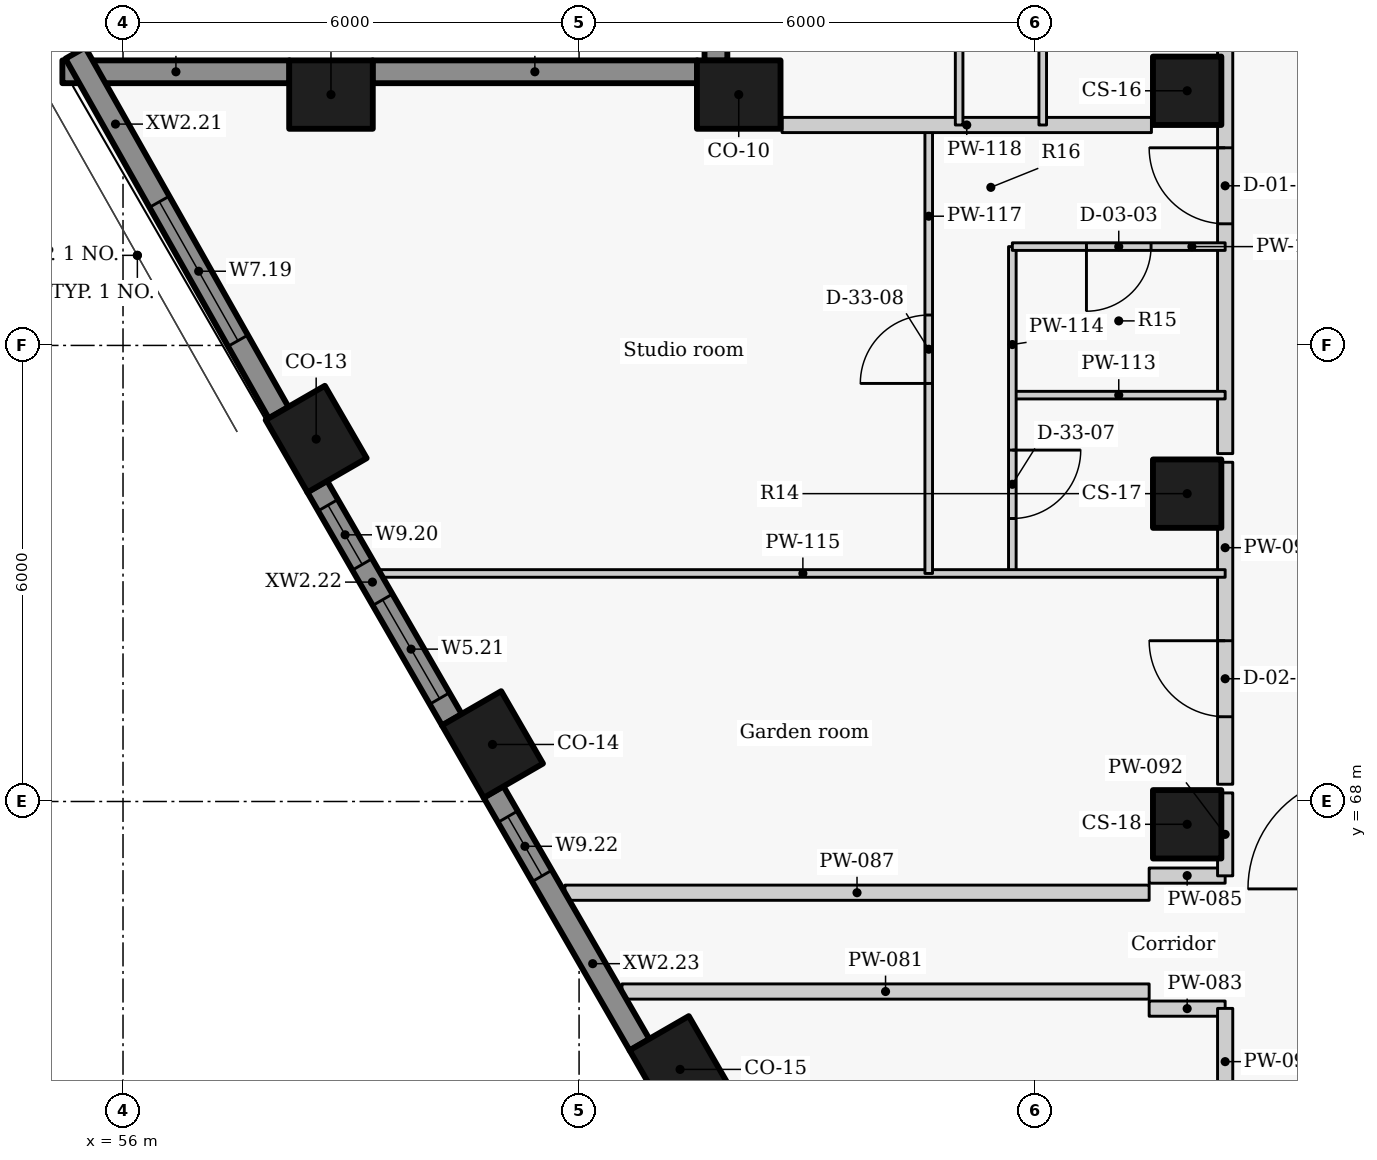
"""IFC4 building model, lengths in metres.
Left out: names, types, materials, properties, quantities, classifications, styles, units other than length and angle.
Written with IfcOpenShell. Run it as: python <this file> out.ifc"""

import sys

from ifc_helpers import new_model, si_unit, direction, frame, frame_2d, origin, origin_2d, place, context, subcontext, project, spatial, rectangle, extrude, element, fill, save


model = new_model("IFC4")
c1 = context("Model", 3, precision=1e-05, world=origin(), true_north=direction((0.0, 1.0)))
c2 = subcontext(c1, "Body", "Model", "MODEL_VIEW")
j1 = project(units=[si_unit("LENGTHUNIT", "METRE"), si_unit("PLANEANGLEUNIT", "RADIAN")], contexts=[c1])
p1 = place(None, origin())
s1 = spatial("IfcSite", under=j1, at=p1, CompositionType="ELEMENT")
p2 = place(p1, origin())
s2 = spatial("IfcBuilding", under=s1, at=p2, CompositionType="ELEMENT")
p3 = place(p2, frame((0.0, 0.0, 239.4)))
s3 = spatial("IfcBuildingStorey", under=s2, at=p3, CompositionType="ELEMENT", Elevation=239.4)
for number, where, z_axis, x_axis in (
    (1, (64.101, 77.3, 0.0), (0.0, 0.0, 1.0), (-1.0, 0.0, 0.0)),
    (2, (58.736, 77.3, 0.0), (0.0, 0.0, 1.0), (-1.0, 0.0, 0.0)),
    (3, (58.541, 72.768, 0.0), (0.0, 0.0, 1.0), (0.5, -0.866, 0.0)),
    (4, (60.861, 68.75, 0.0), (0.0, 0.0, 1.0), (0.5, -0.866, 0.0)),
    (5, (63.329, 64.475, 0.0), (0.0, 0.0, 1.0), (0.5, -0.866, 0.0)),
):
    element("IfcColumn", number, at=place(p3, frame(where, z_axis=z_axis, x_axis=x_axis)), inside=s3, PredefinedType="COLUMN", context=c2, shape_type="SweptSolid", body=[
        extrude(rectangle(XDim=1.1, YDim=0.9, at=origin_2d()), origin(), (0.0, 0.0, 1.0), 3.3),
    ])
for number, where, z_axis, x_axis in (
    (6, (70.0, 77.35, 0.0), (0.0, 0.0, 1.0), (0.0, -1.0, 0.0)),
    (7, (70.0, 72.05, 0.0), (0.0, 0.0, 1.0), (0.0, -1.0, 0.0)),
    (8, (70.0, 67.7, 0.0), (0.0, 0.0, 1.0), (0.0, -1.0, 0.0)),
):
    element("IfcColumn", number, at=place(p3, frame(where, z_axis=z_axis, x_axis=x_axis)), inside=s3, PredefinedType="COLUMN", context=c2, shape_type="SweptSolid", body=[
        extrude(rectangle(XDim=0.9, YDim=0.9, at=origin_2d()), origin(), (0.0, 0.0, 1.0), 3.3),
    ])
p4 = place(p3, frame((63.801, 82.154, 0.0), z_axis=(0.0, 0.0, 1.0), x_axis=(0.0, -1.0, 0.0)))
e9 = element("IfcWall", 9, at=p4, inside=s3, PredefinedType="SOLIDWALL", context=c2, shape_type="SweptSolid", body=[
    extrude(rectangle(XDim=4.408, YDim=0.3, at=frame_2d((2.204, 0.0))), origin(), (0.0, 0.0, 1.0), 2.425),
])
p5 = place(p4, frame((0.352, 0.0, 0.9)))
e10 = element("IfcOpeningElement", 10, at=p5, cuts=e9, PredefinedType="OPENING", context=c2, shape_type="SweptSolid", body=[
    extrude(rectangle(XDim=0.6, YDim=1.1, at=frame_2d((0.3, 0.55))), frame((0.0, 0.16, 0.0), z_axis=(0.0, -1.0, 0.0), x_axis=(1.0, 0.0, 0.0)), (0.0, 0.0, 1.0), 0.32),
])
p6 = place(p4, frame((1.769, 0.0, 0.9)))
e11 = element("IfcOpeningElement", 11, at=p6, cuts=e9, PredefinedType="OPENING", context=c2, shape_type="SweptSolid", body=[
    extrude(rectangle(XDim=2.1, YDim=1.1, at=frame_2d((1.05, 0.55))), frame((0.0, 0.16, 0.0), z_axis=(0.0, -1.0, 0.0), x_axis=(1.0, 0.0, 0.0)), (0.0, 0.0, 1.0), 0.32),
])
p7 = place(p3, frame((63.554, 77.6, 0.0), z_axis=(0.0, 0.0, 1.0), x_axis=(-1.0, 0.0, 0.0)))
e12 = element("IfcWall", 12, at=p7, inside=s3, PredefinedType="SOLIDWALL", context=c2, shape_type="SweptSolid", body=[
    extrude(rectangle(XDim=4.272, YDim=0.3, at=frame_2d((2.136, 0.0))), origin(), (0.0, 0.0, 1.0), 2.425),
])
p8 = place(p3, frame((58.19, 77.6, 0.0), z_axis=(0.0, 0.0, 1.0), x_axis=(-1.0, 0.0, 0.0)))
e13 = element("IfcWall", 13, at=p8, inside=s3, PredefinedType="SOLIDWALL", context=c2, shape_type="SweptSolid", body=[
    extrude(rectangle(XDim=2.988, YDim=0.3, at=frame_2d((1.494, 0.0))), origin(), (0.0, 0.0, 1.0), 2.425),
])
p9 = place(p3, frame((55.373, 77.846, 0.0), z_axis=(0.0, 0.0, 1.0), x_axis=(0.492080931903, -0.870549456641, 0.0)))
e14 = element("IfcWall", 14, at=p9, inside=s3, PredefinedType="SOLIDWALL", context=c2, shape_type="SweptSolid", body=[
    extrude(rectangle(XDim=5.437, YDim=0.3, at=frame_2d((2.718, 0.0))), origin(), (0.0, 0.0, 1.0), 2.425),
])
p10 = place(p9, frame((2.247, 0.0, 0.9)))
e15 = element("IfcOpeningElement", 15, at=p10, cuts=e14, PredefinedType="OPENING", context=c2, shape_type="SweptSolid", body=[
    extrude(rectangle(XDim=2.1, YDim=1.1, at=frame_2d((1.05, 0.55))), frame((0.0, 0.16, 0.0), z_axis=(0.0, -1.0, 0.0), x_axis=(1.0, 0.0, 0.0)), (0.0, 0.0, 1.0), 0.32),
])
p11 = place(p3, frame((58.554, 72.145, 0.0), z_axis=(0.0, 0.0, 1.0), x_axis=(0.500010404316, -0.866019396766, 0.0)))
e16 = element("IfcWall", 16, at=p11, inside=s3, PredefinedType="SOLIDWALL", context=c2, shape_type="SweptSolid", body=[
    extrude(rectangle(XDim=3.547, YDim=0.3, at=frame_2d((1.774, 0.0))), origin(), (0.0, 0.0, 1.0), 2.425),
])
p12 = place(p11, frame((0.285, 0.0, 0.9)))
e17 = element("IfcOpeningElement", 17, at=p12, cuts=e16, PredefinedType="OPENING", context=c2, shape_type="SweptSolid", body=[
    extrude(rectangle(XDim=0.9, YDim=1.1, at=frame_2d((0.45, 0.55))), frame((0.0, 0.16, 0.0), z_axis=(0.0, -1.0, 0.0), x_axis=(1.0, 0.0, 0.0)), (0.0, 0.0, 1.0), 0.32),
])
p13 = place(p11, frame((1.722, 0.0, 0.9)))
e18 = element("IfcOpeningElement", 18, at=p13, cuts=e16, PredefinedType="OPENING", context=c2, shape_type="SweptSolid", body=[
    extrude(rectangle(XDim=1.5, YDim=1.1, at=frame_2d((0.75, 0.55))), frame((0.0, 0.16, 0.0), z_axis=(0.0, -1.0, 0.0), x_axis=(1.0, 0.0, 0.0)), (0.0, 0.0, 1.0), 0.32),
])
p14 = place(p3, frame((60.874, 68.127, 0.0), z_axis=(0.0, 0.0, 1.0), x_axis=(0.499984490703, -0.866034357896, 0.0)))
e19 = element("IfcWall", 19, at=p14, inside=s3, PredefinedType="SOLIDWALL", context=c2, shape_type="SweptSolid", body=[
    extrude(rectangle(XDim=3.844, YDim=0.3, at=frame_2d((1.922, 0.0))), origin(), (0.0, 0.0, 1.0), 2.425),
])
p15 = place(p14, frame((0.377, 0.0, 0.9)))
e20 = element("IfcOpeningElement", 20, at=p15, cuts=e19, PredefinedType="OPENING", context=c2, shape_type="SweptSolid", body=[
    extrude(rectangle(XDim=0.9, YDim=1.1, at=frame_2d((0.45, 0.55))), frame((0.0, 0.16, 0.0), z_axis=(0.0, -1.0, 0.0), x_axis=(1.0, 0.0, 0.0)), (0.0, 0.0, 1.0), 0.32),
])
p16 = place(p3, frame((62.564, 65.5, 0.0), z_axis=(0.0, 0.0, 1.0), x_axis=(1.0, 0.0, 0.0)))
e21 = element("IfcWall", 21, at=p16, inside=s3, PredefinedType="PARTITIONING", context=c2, shape_type="SweptSolid", body=[
    extrude(rectangle(XDim=6.936, YDim=0.2, at=frame_2d((3.468, 0.0))), origin(), (0.0, 0.0, 1.0), 2.405),
])
for number, where, z_axis, x_axis in (
    (22, (69.5, 65.275, 0.0), (0.0, 0.0, 1.0), (1.0, 0.0, 0.0)),
    (23, (69.5, 67.025, 0.0), (0.0, 0.0, 1.0), (1.0, 0.0, 0.0)),
):
    element("IfcWall", number, at=place(p3, frame(where, z_axis=z_axis, x_axis=x_axis)), inside=s3, PredefinedType="PARTITIONING", context=c2, shape_type="SweptSolid", body=[
        extrude(rectangle(XDim=1.0, YDim=0.2, at=frame_2d((0.5, 0.0))), origin(), (0.0, 0.0, 1.0), 2.505),
    ])
p17 = place(p3, frame((61.813, 66.8, 0.0), z_axis=(0.0, 0.0, 1.0), x_axis=(1.0, 0.0, 0.0)))
e24 = element("IfcWall", 24, at=p17, inside=s3, PredefinedType="PARTITIONING", context=c2, shape_type="SweptSolid", body=[
    extrude(rectangle(XDim=7.687, YDim=0.2, at=frame_2d((3.843, 0.0))), origin(), (0.0, 0.0, 1.0), 2.405),
])
p18 = place(p3, frame((70.5, 63.877, 0.0), z_axis=(0.0, 0.0, 1.0), x_axis=(0.0, 1.0, 0.0)))
e25 = element("IfcWall", 25, at=p18, inside=s3, PredefinedType="PARTITIONING", context=c2, shape_type="SweptSolid", body=[
    extrude(rectangle(XDim=1.401, YDim=0.2, at=frame_2d((0.701, 0.0))), origin(), (0.0, 0.0, 1.0), 3.025),
])
p19 = place(p3, frame((70.5, 67.022, 0.0), z_axis=(0.0, 0.0, 1.0), x_axis=(0.0, 1.0, 0.0)))
e26 = element("IfcWall", 26, at=p19, inside=s3, PredefinedType="PARTITIONING", context=c2, shape_type="SweptSolid", body=[
    extrude(rectangle(XDim=1.091, YDim=0.2, at=frame_2d((0.545, 0.0))), origin(), (0.0, 0.0, 1.0), 3.025),
])
p20 = place(p3, frame((70.5, 68.227, 0.0), z_axis=(0.0, 0.0, 1.0), x_axis=(0.0, 1.0, 0.0)))
e27 = element("IfcWall", 27, at=p20, inside=s3, PredefinedType="PARTITIONING", context=c2, shape_type="SweptSolid", body=[
    extrude(rectangle(XDim=4.236, YDim=0.2, at=frame_2d((2.118, 0.0))), origin(), (0.0, 0.0, 1.0), 3.025),
])
p21 = place(p20, frame((0.888, 0.0, 0.0)))
e28 = element("IfcOpeningElement", 28, at=p21, cuts=e27, PredefinedType="OPENING", context=c2, shape_type="SweptSolid", body=[
    extrude(rectangle(XDim=1.0, YDim=2.1, at=frame_2d((0.5, 1.05))), frame((0.0, 0.11, 0.0), z_axis=(0.0, -1.0, 0.0), x_axis=(1.0, 0.0, 0.0)), (0.0, 0.0, 1.0), 0.22),
])
p22 = place(p3, frame((70.5, 72.577, 0.0), z_axis=(0.0, 0.0, 1.0), x_axis=(0.0, 1.0, 0.0)))
e29 = element("IfcWall", 29, at=p22, inside=s3, PredefinedType="PARTITIONING", context=c2, shape_type="SweptSolid", body=[
    extrude(rectangle(XDim=10.486, YDim=0.2, at=frame_2d((5.243, 0.0))), origin(), (0.0, 0.0, 1.0), 3.025),
])
p23 = place(p22, frame((3.023, 0.0, 0.0)))
e30 = element("IfcOpeningElement", 30, at=p23, cuts=e29, PredefinedType="OPENING", context=c2, shape_type="SweptSolid", body=[
    extrude(rectangle(XDim=1.0, YDim=2.1, at=frame_2d((0.5, 1.05))), frame((0.0, 0.11, 0.0), z_axis=(0.0, -1.0, 0.0), x_axis=(1.0, 0.0, 0.0)), (0.0, 0.0, 1.0), 0.22),
])
p24 = place(p3, frame((67.7, 73.346, 0.0), z_axis=(0.0, 0.0, 1.0), x_axis=(1.0, 0.0, 0.0)))
e31 = element("IfcWall", 31, at=p24, inside=s3, PredefinedType="PARTITIONING", context=c2, shape_type="SweptSolid", body=[
    extrude(rectangle(XDim=2.8, YDim=0.1, at=frame_2d((1.4, 0.0))), origin(), (0.0, 0.0, 1.0), 2.505),
])
p25 = place(p3, frame((67.7, 75.3, 0.0), z_axis=(0.0, 0.0, 1.0), x_axis=(0.0, -1.0, 0.0)))
e32 = element("IfcWall", 32, at=p25, inside=s3, PredefinedType="PARTITIONING", context=c2, shape_type="SweptSolid", body=[
    extrude(rectangle(XDim=4.3, YDim=0.1, at=frame_2d((2.15, 0.0))), origin(), (0.0, 0.0, 1.0), 3.025),
])
p26 = place(p25, frame((2.677, 0.0, 0.0)))
e33 = element("IfcOpeningElement", 33, at=p26, cuts=e32, PredefinedType="OPENING", context=c2, shape_type="SweptSolid", body=[
    extrude(rectangle(XDim=0.9, YDim=2.1, at=frame_2d((0.45, 1.05))), frame((0.0, 0.06, 0.0), z_axis=(0.0, -1.0, 0.0), x_axis=(1.0, 0.0, 0.0)), (0.0, 0.0, 1.0), 0.12),
])
p27 = place(p3, frame((59.389, 71.0, 0.0), z_axis=(0.0, 0.0, 1.0), x_axis=(1.0, 0.0, 0.0)))
e34 = element("IfcWall", 34, at=p27, inside=s3, PredefinedType="PARTITIONING", context=c2, shape_type="SweptSolid", body=[
    extrude(rectangle(XDim=11.111, YDim=0.1, at=frame_2d((5.556, 0.0))), origin(), (0.0, 0.0, 1.0), 2.405),
])
p28 = place(p3, frame((70.5, 75.3, 0.0), z_axis=(0.0, 0.0, 1.0), x_axis=(-1.0, 0.0, 0.0)))
e35 = element("IfcWall", 35, at=p28, inside=s3, PredefinedType="PARTITIONING", context=c2, shape_type="SweptSolid", body=[
    extrude(rectangle(XDim=2.8, YDim=0.1, at=frame_2d((1.4, 0.0))), origin(), (0.0, 0.0, 1.0), 2.505),
])
p29 = place(p28, frame((0.975, 0.0, 0.0)))
e36 = element("IfcOpeningElement", 36, at=p29, cuts=e35, PredefinedType="OPENING", context=c2, shape_type="SweptSolid", body=[
    extrude(rectangle(XDim=0.85, YDim=2.1, at=frame_2d((0.425, 1.05))), frame((0.0, 0.06, 0.0), z_axis=(0.0, -1.0, 0.0), x_axis=(1.0, 0.0, 0.0)), (0.0, 0.0, 1.0), 0.12),
])
p30 = place(p3, frame((66.6, 71.0, 0.0), z_axis=(0.0, 0.0, 1.0), x_axis=(0.0, 1.0, 0.0)))
e37 = element("IfcWall", 37, at=p30, inside=s3, PredefinedType="PARTITIONING", context=c2, shape_type="SweptSolid", body=[
    extrude(rectangle(XDim=5.9, YDim=0.1, at=frame_2d((2.95, 0.0))), origin(), (0.0, 0.0, 1.0), 3.025),
])
p31 = place(p30, frame((2.5, 0.0, 0.0)))
e38 = element("IfcOpeningElement", 38, at=p31, cuts=e37, PredefinedType="OPENING", context=c2, shape_type="SweptSolid", body=[
    extrude(rectangle(XDim=0.9, YDim=2.1, at=frame_2d((0.45, 1.05))), frame((0.0, 0.06, 0.0), z_axis=(0.0, -1.0, 0.0), x_axis=(1.0, 0.0, 0.0)), (0.0, 0.0, 1.0), 0.12),
])
p32 = place(p3, frame((64.67, 76.9, 0.0), z_axis=(0.0, 0.0, 1.0), x_axis=(1.0, 0.0, 0.0)))
e39 = element("IfcWall", 39, at=p32, inside=s3, PredefinedType="PARTITIONING", context=c2, shape_type="SweptSolid", body=[
    extrude(rectangle(XDim=4.86, YDim=0.2, at=frame_2d((2.43, 0.0))), origin(), (0.0, 0.0, 1.0), 3.025),
])
p33 = place(p3, frame((68.1, 84.9, 0.0), z_axis=(0.0, 0.0, 1.0), x_axis=(0.0, -1.0, 0.0)))
e40 = element("IfcWall", 40, at=p33, inside=s3, PredefinedType="PARTITIONING", context=c2, shape_type="SweptSolid", body=[
    extrude(rectangle(XDim=8.0, YDim=0.1, at=frame_2d((4.0, 0.0))), origin(), (0.0, 0.0, 1.0), 3.025),
])
p34 = place(p33, frame((5.368, 0.0, 0.0)))
e41 = element("IfcOpeningElement", 41, at=p34, cuts=e40, PredefinedType="OPENING", context=c2, shape_type="SweptSolid", body=[
    extrude(rectangle(XDim=0.9, YDim=2.1, at=frame_2d((0.45, 1.05))), frame((0.0, 0.06, 0.0), z_axis=(0.0, -1.0, 0.0), x_axis=(1.0, 0.0, 0.0)), (0.0, 0.0, 1.0), 0.12),
])
p35 = place(p33, frame((1.393, 0.0, 0.0)))
e42 = element("IfcOpeningElement", 42, at=p35, cuts=e40, PredefinedType="OPENING", context=c2, shape_type="SweptSolid", body=[
    extrude(rectangle(XDim=0.85, YDim=2.1, at=frame_2d((0.425, 1.05))), frame((0.0, 0.06, 0.0), z_axis=(0.0, -1.0, 0.0), x_axis=(1.0, 0.0, 0.0)), (0.0, 0.0, 1.0), 0.12),
])
p36 = place(p3, frame((67.0, 76.9, 0.0), z_axis=(0.0, 0.0, 1.0), x_axis=(0.0, 1.0, 0.0)))
e43 = element("IfcWall", 43, at=p36, inside=s3, PredefinedType="PARTITIONING", context=c2, shape_type="SweptSolid", body=[
    extrude(rectangle(XDim=9.6, YDim=0.1, at=frame_2d((4.8, 0.0))), origin(), (0.0, 0.0, 1.0), 3.025),
])
p37 = place(p36, frame((1.55, 0.0, 0.0)))
e44 = element("IfcOpeningElement", 44, at=p37, cuts=e43, PredefinedType="OPENING", context=c2, shape_type="SweptSolid", body=[
    extrude(rectangle(XDim=0.9, YDim=2.1, at=frame_2d((0.45, 1.05))), frame((0.0, 0.06, 0.0), z_axis=(0.0, -1.0, 0.0), x_axis=(1.0, 0.0, 0.0)), (0.0, 0.0, 1.0), 0.12),
])
p38 = place(p36, frame((4.95, 0.0, 0.0)))
e45 = element("IfcOpeningElement", 45, at=p38, cuts=e43, PredefinedType="OPENING", context=c2, shape_type="SweptSolid", body=[
    extrude(rectangle(XDim=0.9, YDim=2.1, at=frame_2d((0.45, 1.05))), frame((0.0, 0.06, 0.0), z_axis=(0.0, -1.0, 0.0), x_axis=(1.0, 0.0, 0.0)), (0.0, 0.0, 1.0), 0.12),
])
p39 = place(p36, frame((7.75, 0.0, 0.0)))
e46 = element("IfcOpeningElement", 46, at=p39, cuts=e43, PredefinedType="OPENING", context=c2, shape_type="SweptSolid", body=[
    extrude(rectangle(XDim=0.9, YDim=2.1, at=frame_2d((0.45, 1.05))), frame((0.0, 0.06, 0.0), z_axis=(0.0, -1.0, 0.0), x_axis=(1.0, 0.0, 0.0)), (0.0, 0.0, 1.0), 0.12),
])
p40 = place(p10, origin())
e47 = element("IfcWindow", 47, at=p40, inside=s3, PartitioningType="SINGLE_PANEL", PredefinedType="WINDOW", context=c2, shape_type="SweptSolid", body=[
    extrude(rectangle(XDim=2.1, YDim=1.1, at=frame_2d((1.05, 0.55))), frame((0.0, 0.03, 0.0), z_axis=(0.0, -1.0, 0.0), x_axis=(1.0, 0.0, 0.0)), (0.0, 0.0, 1.0), 0.06),
])
fill(e15, e47)
p41 = place(p12, origin())
e48 = element("IfcWindow", 48, at=p41, inside=s3, PartitioningType="SINGLE_PANEL", PredefinedType="WINDOW", context=c2, shape_type="SweptSolid", body=[
    extrude(rectangle(XDim=0.9, YDim=1.1, at=frame_2d((0.45, 0.55))), frame((0.0, 0.03, 0.0), z_axis=(0.0, -1.0, 0.0), x_axis=(1.0, 0.0, 0.0)), (0.0, 0.0, 1.0), 0.06),
])
fill(e17, e48)
p42 = place(p13, origin())
e49 = element("IfcWindow", 49, at=p42, inside=s3, PartitioningType="SINGLE_PANEL", PredefinedType="WINDOW", context=c2, shape_type="SweptSolid", body=[
    extrude(rectangle(XDim=1.5, YDim=1.1, at=frame_2d((0.75, 0.55))), frame((0.0, 0.03, 0.0), z_axis=(0.0, -1.0, 0.0), x_axis=(1.0, 0.0, 0.0)), (0.0, 0.0, 1.0), 0.06),
])
fill(e18, e49)
p43 = place(p15, origin())
e50 = element("IfcWindow", 50, at=p43, inside=s3, PartitioningType="SINGLE_PANEL", PredefinedType="WINDOW", context=c2, shape_type="SweptSolid", body=[
    extrude(rectangle(XDim=0.9, YDim=1.1, at=frame_2d((0.45, 0.55))), frame((0.0, 0.03, 0.0), z_axis=(0.0, -1.0, 0.0), x_axis=(1.0, 0.0, 0.0)), (0.0, 0.0, 1.0), 0.06),
])
fill(e20, e50)
p44 = place(p23, origin())
e51 = element("IfcDoor", 51, at=p44, inside=s3, OperationType="SINGLE_SWING_RIGHT", PredefinedType="DOOR", context=c2, shape_type="SweptSolid", body=[
    extrude(rectangle(XDim=1.0, YDim=2.1, at=frame_2d((0.5, 1.05))), frame((0.0, 0.025, 0.0), z_axis=(0.0, -1.0, 0.0), x_axis=(1.0, 0.0, 0.0)), (0.0, 0.0, 1.0), 0.05),
])
fill(e30, e51)
p45 = place(p26, origin())
e52 = element("IfcDoor", 52, at=p45, inside=s3, OperationType="SINGLE_SWING_LEFT", PredefinedType="DOOR", context=c2, shape_type="SweptSolid", body=[
    extrude(rectangle(XDim=0.9, YDim=2.1, at=frame_2d((0.45, 1.05))), frame((0.0, 0.025, 0.0), z_axis=(0.0, -1.0, 0.0), x_axis=(1.0, 0.0, 0.0)), (0.0, 0.0, 1.0), 0.05),
])
fill(e33, e52)
p46 = place(p29, origin())
e53 = element("IfcDoor", 53, at=p46, inside=s3, OperationType="SINGLE_SWING_RIGHT", PredefinedType="DOOR", context=c2, shape_type="SweptSolid", body=[
    extrude(rectangle(XDim=0.85, YDim=2.1, at=frame_2d((0.425, 1.05))), frame((0.0, 0.025, 0.0), z_axis=(0.0, -1.0, 0.0), x_axis=(1.0, 0.0, 0.0)), (0.0, 0.0, 1.0), 0.05),
])
fill(e36, e53)
p47 = place(p31, origin())
e54 = element("IfcDoor", 54, at=p47, inside=s3, OperationType="SINGLE_SWING_LEFT", PredefinedType="DOOR", context=c2, shape_type="SweptSolid", body=[
    extrude(rectangle(XDim=0.9, YDim=2.1, at=frame_2d((0.45, 1.05))), frame((0.0, 0.025, 0.0), z_axis=(0.0, -1.0, 0.0), x_axis=(1.0, 0.0, 0.0)), (0.0, 0.0, 1.0), 0.05),
])
fill(e38, e54)
p48 = place(p21, origin())
e55 = element("IfcDoor", 55, at=p48, inside=s3, OperationType="SINGLE_SWING_RIGHT", PredefinedType="DOOR", context=c2, shape_type="SweptSolid", body=[
    extrude(rectangle(XDim=1.0, YDim=2.1, at=frame_2d((0.5, 1.05))), frame((0.0, 0.025, 0.0), z_axis=(0.0, -1.0, 0.0), x_axis=(1.0, 0.0, 0.0)), (0.0, 0.0, 1.0), 0.05),
])
fill(e28, e55)
save(model, sys.argv[1])
